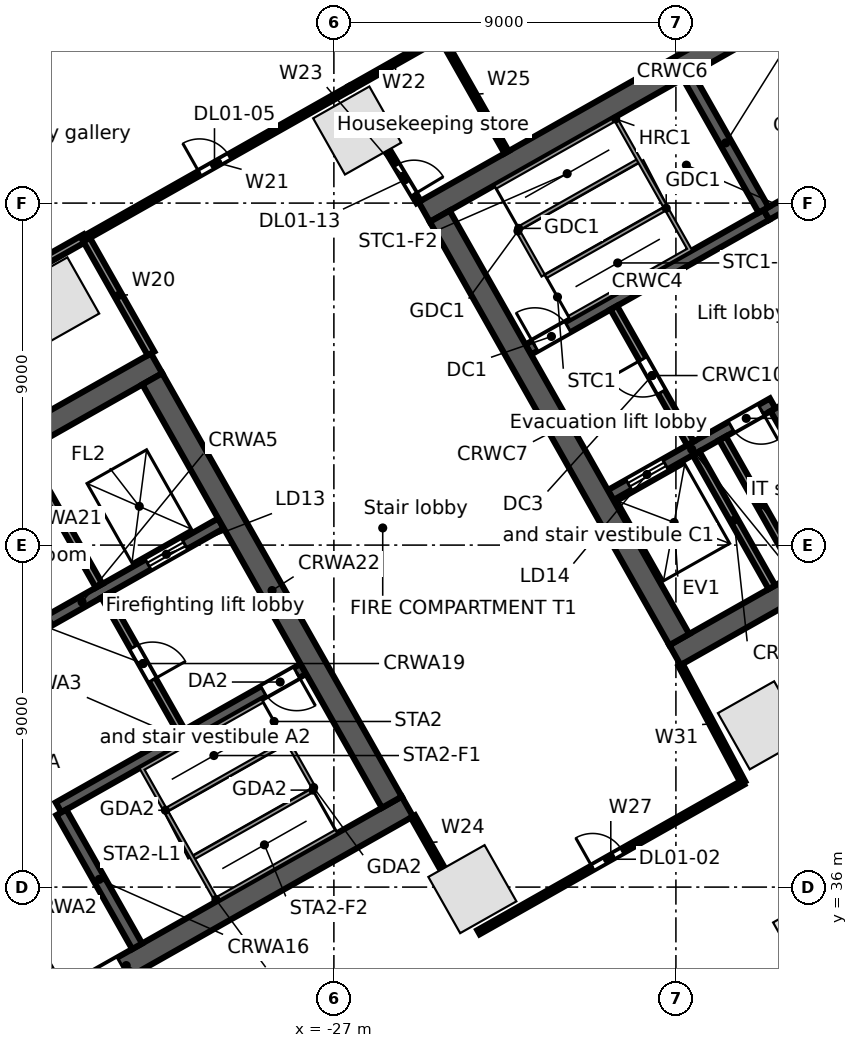
"""IFC4 building model, lengths in metres.
Left out: names, types, materials, properties, quantities, classifications, styles, units other than length and angle.
Written with IfcOpenShell. Run it as: python <this file> out.ifc"""

import sys

from ifc_helpers import new_model, si_unit, direction, frame, frame_2d, origin, origin_2d, place, context, subcontext, project, spatial, rectangle, extrude, element, fill, save


model = new_model("IFC4")
c1 = context("Model", 3, precision=1e-05, world=origin(), true_north=direction((0.0, 1.0)))
c2 = subcontext(c1, "Body", "Model", "MODEL_VIEW")
j1 = project(units=[si_unit("LENGTHUNIT", "METRE"), si_unit("PLANEANGLEUNIT", "RADIAN")], contexts=[c1])
p1 = place(None, origin())
s1 = spatial("IfcSite", under=j1, at=p1, CompositionType="ELEMENT")
p2 = place(p1, origin())
s2 = spatial("IfcBuilding", under=s1, at=p2, CompositionType="ELEMENT")
p3 = place(p2, frame((0.0, 0.0, 11.5)))
s3 = spatial("IfcBuildingStorey", under=s2, at=p3, CompositionType="ELEMENT", Elevation=11.5)
for number, where, z_axis, x_axis in (
    (1, (-26.388, 55.91, 0.0), (0.0, 0.0, 1.0), (-0.87, -0.492, 0.0)),
    (2, (-34.334, 51.414, 0.0), (0.0, 0.0, 1.0), (-0.87, -0.492, 0.0)),
    (3, (-23.356, 35.946, 0.0), (0.0, 0.0, 1.0), (0.87, 0.492, 0.0)),
    (4, (-15.736, 40.257, 0.0), (0.0, 0.0, 1.0), (0.87, 0.492, 0.0)),
):
    element("IfcColumn", number, at=place(p3, frame(where, z_axis=z_axis, x_axis=x_axis)), inside=s3, PredefinedType="COLUMN", context=c2, shape_type="SweptSolid", body=[
        extrude(rectangle(XDim=1.7, YDim=1.7, at=origin_2d()), origin(), (0.0, 0.0, 1.0), 5.0),
    ])
p4 = place(p3, frame((-14.761, 34.88, 0.0), z_axis=(0.0, 0.0, 1.0), x_axis=(0.87035569594, 0.492423560103, 0.0)))
e5 = element("IfcColumn", 5, at=p4, inside=s3, PredefinedType="COLUMN", context=c2, shape_type="SweptSolid", body=[
    extrude(rectangle(XDim=1.0, YDim=1.0, at=origin_2d()), origin(), (0.0, 0.0, 1.0), 5.0),
])
p5 = place(p3, frame((-63.707, 41.701, 0.0), z_axis=(0.0, 0.0, 1.0), x_axis=(0.870355510268, 0.492423888277, 0.0)))
e6 = element("IfcWall", 6, at=p5, inside=s3, PredefinedType="STANDARD", context=c2, shape_type="SweptSolid", body=[
    extrude(rectangle(XDim=67.903, YDim=0.3, at=frame_2d((33.952, 0.0))), origin(), (0.0, 0.0, 1.0), 4.65),
])
p6 = place(p3, frame((-39.862, 29.749, 0.0), z_axis=(0.0, 0.0, 1.0), x_axis=(0.870350116061, 0.492433422375, 0.0)))
e7 = element("IfcWall", 7, at=p6, inside=s3, PredefinedType="SOLIDWALL", context=c2, shape_type="SweptSolid", body=[
    extrude(rectangle(XDim=17.0, YDim=0.6, at=frame_2d((8.5, 0.0))), origin(), (0.0, 0.0, 1.0), 4.65),
])
p7 = place(p6, frame((7.2, 0.0, 0.0)))
e8 = element("IfcOpeningElement", 8, at=p7, cuts=e7, PredefinedType="OPENING", context=c2, shape_type="SweptSolid", body=[
    extrude(rectangle(XDim=1.2, YDim=2.1, at=frame_2d((0.6, 1.05))), frame((0.0, 0.31, 0.0), z_axis=(0.0, -1.0, 0.0), x_axis=(1.0, 0.0, 0.0)), (0.0, 0.0, 1.0), 0.62),
])
p8 = place(p3, frame((-34.245, 38.097, 0.0), z_axis=(0.0, 0.0, 1.0), x_axis=(0.870364910201, 0.492407273597, 0.0)))
e9 = element("IfcWall", 9, at=p8, inside=s3, PredefinedType="SOLIDWALL", context=c2, shape_type="SweptSolid", body=[
    extrude(rectangle(XDim=7.4, YDim=0.3, at=frame_2d((3.7, 0.0))), origin(), (0.0, 0.0, 1.0), 4.65),
])
p9 = place(p8, frame((6.2, 0.0, 0.0)))
e10 = element("IfcOpeningElement", 10, at=p9, cuts=e9, PredefinedType="OPENING", context=c2, shape_type="SweptSolid", body=[
    extrude(rectangle(XDim=1.0, YDim=2.1, at=frame_2d((0.5, 1.05))), frame((0.0, 0.16, 0.0), z_axis=(0.0, -1.0, 0.0), x_axis=(1.0, 0.0, 0.0)), (0.0, 0.0, 1.0), 0.32),
])
p10 = place(p3, frame((-37.282, 41.435, 0.0), z_axis=(0.0, 0.0, 1.0), x_axis=(0.870356516133, 0.492422110414, 0.0)))
e11 = element("IfcWall", 11, at=p10, inside=s3, PredefinedType="SOLIDWALL", context=c2, shape_type="SweptSolid", body=[
    extrude(rectangle(XDim=8.4, YDim=0.3, at=frame_2d((4.2, 0.0))), origin(), (0.0, 0.0, 1.0), 4.65),
])
p11 = place(p10, frame((6.2, 0.0, 0.0)))
e12 = element("IfcOpeningElement", 12, at=p11, cuts=e11, PredefinedType="OPENING", context=c2, shape_type="SweptSolid", body=[
    extrude(rectangle(XDim=1.1, YDim=2.1, at=frame_2d((0.55, 1.05))), frame((0.0, 0.16, 0.0), z_axis=(0.0, -1.0, 0.0), x_axis=(1.0, 0.0, 0.0)), (0.0, 0.0, 1.0), 0.32),
])
p12 = place(p10, frame((2.35, 0.0, 0.0)))
e13 = element("IfcOpeningElement", 13, at=p12, cuts=e11, PredefinedType="OPENING", context=c2, shape_type="SweptSolid", body=[
    extrude(rectangle(XDim=0.9, YDim=2.1, at=frame_2d((0.45, 1.05))), frame((0.0, 0.16, 0.0), z_axis=(0.0, -1.0, 0.0), x_axis=(1.0, 0.0, 0.0)), (0.0, 0.0, 1.0), 0.32),
])
p13 = place(p3, frame((-46.461, 41.412, 0.0), z_axis=(0.0, 0.0, 1.0), x_axis=(0.870350116061, 0.492433422375, 0.0)))
e14 = element("IfcWall", 14, at=p13, inside=s3, PredefinedType="SOLIDWALL", context=c2, shape_type="SweptSolid", body=[
    extrude(rectangle(XDim=17.0, YDim=0.6, at=frame_2d((8.5, 0.0))), origin(), (0.0, 0.0, 1.0), 4.65),
])
p14 = place(p3, frame((-36.26, 36.785, 0.0), z_axis=(0.0, 0.0, 1.0), x_axis=(0.492440575896, -0.870346068648, 0.0)))
e15 = element("IfcWall", 15, at=p14, inside=s3, PredefinedType="SOLIDWALL", context=c2, shape_type="SweptSolid", body=[
    extrude(rectangle(XDim=4.05, YDim=0.3, at=frame_2d((2.025, 0.0))), origin(), (0.0, 0.0, 1.0), 4.65),
])
p15 = place(p3, frame((-34.171, 37.967, 0.0), z_axis=(0.0, 0.0, 1.0), x_axis=(0.492394910396, -0.870371904542, 0.0)))
e16 = element("IfcWall", 16, at=p15, inside=s3, PredefinedType="SOLIDWALL", context=c2, shape_type="SweptSolid", body=[
    extrude(rectangle(XDim=4.05, YDim=0.3, at=frame_2d((2.025, 0.0))), origin(), (0.0, 0.0, 1.0), 4.65),
])
p16 = place(p3, frame((-33.031, 43.667, 0.0), z_axis=(0.0, 0.0, 1.0), x_axis=(0.492408451753, -0.87036424366, 0.0)))
e17 = element("IfcWall", 17, at=p16, inside=s3, PredefinedType="PARTITIONING", context=c2, shape_type="SweptSolid", body=[
    extrude(rectangle(XDim=4.1, YDim=0.2, at=frame_2d((2.05, 0.0))), origin(), (0.0, 0.0, 1.0), 4.65),
])
p17 = place(p16, frame((1.55, 0.0, 0.0)))
e18 = element("IfcOpeningElement", 18, at=p17, cuts=e17, PredefinedType="OPENING", context=c2, shape_type="SweptSolid", body=[
    extrude(rectangle(XDim=1.0, YDim=2.1, at=frame_2d((0.5, 1.05))), frame((0.0, 0.11, 0.0), z_axis=(0.0, -1.0, 0.0), x_axis=(1.0, 0.0, 0.0)), (0.0, 0.0, 1.0), 0.22),
])
p18 = place(p3, frame((-35.173, 47.454, 0.0), z_axis=(0.0, 0.0, 1.0), x_axis=(0.492440575896, -0.870346068648, 0.0)))
e19 = element("IfcWall", 19, at=p18, inside=s3, PredefinedType="SOLIDWALL", context=c2, shape_type="SweptSolid", body=[
    extrude(rectangle(XDim=4.05, YDim=0.2, at=frame_2d((2.025, 0.0))), origin(), (0.0, 0.0, 1.0), 4.65),
])
p19 = place(p3, frame((-31.778, 49.374, 0.0), z_axis=(0.0, 0.0, 1.0), x_axis=(0.492433046652, -0.870350328641, 0.0)))
e20 = element("IfcWall", 20, at=p19, inside=s3, PredefinedType="SOLIDWALL", context=c2, shape_type="SweptSolid", body=[
    extrude(rectangle(XDim=12.8, YDim=0.6, at=frame_2d((6.4, 0.0))), origin(), (0.0, 0.0, 1.0), 4.65),
])
p20 = place(p3, frame((-18.024, 42.104, 0.0), z_axis=(0.0, 0.0, 1.0), x_axis=(0.870360574057, 0.492414937962, 0.0)))
e21 = element("IfcWall", 21, at=p20, inside=s3, PredefinedType="SOLIDWALL", context=c2, shape_type="SweptSolid", body=[
    extrude(rectangle(XDim=15.0, YDim=0.6, at=frame_2d((7.5, 0.0))), origin(), (0.0, 0.0, 1.0), 4.65),
])
p21 = place(p20, frame((6.1, 0.0, 0.0)))
e22 = element("IfcOpeningElement", 22, at=p21, cuts=e21, PredefinedType="OPENING", context=c2, shape_type="SweptSolid", body=[
    extrude(rectangle(XDim=1.2, YDim=2.1, at=frame_2d((0.6, 1.05))), frame((0.0, 0.31, 0.0), z_axis=(0.0, -1.0, 0.0), x_axis=(1.0, 0.0, 0.0)), (0.0, 0.0, 1.0), 0.62),
])
p22 = place(p3, frame((-19.718, 46.316, 0.0), z_axis=(0.0, 0.0, 1.0), x_axis=(0.870353963862, 0.492426621528, 0.0)))
e23 = element("IfcWall", 23, at=p22, inside=s3, PredefinedType="SOLIDWALL", context=c2, shape_type="SweptSolid", body=[
    extrude(rectangle(XDim=4.9, YDim=0.3, at=frame_2d((2.45, 0.0))), origin(), (0.0, 0.0, 1.0), 4.65),
])
p23 = place(p22, frame((0.55, 0.0, 0.0)))
e24 = element("IfcOpeningElement", 24, at=p23, cuts=e23, PredefinedType="OPENING", context=c2, shape_type="SweptSolid", body=[
    extrude(rectangle(XDim=1.1, YDim=2.1, at=frame_2d((0.55, 1.05))), frame((0.0, 0.16, 0.0), z_axis=(0.0, -1.0, 0.0), x_axis=(1.0, 0.0, 0.0)), (0.0, 0.0, 1.0), 0.32),
])
p24 = place(p22, frame((3.65, 0.0, 0.0)))
e25 = element("IfcOpeningElement", 25, at=p24, cuts=e23, PredefinedType="OPENING", context=c2, shape_type="SweptSolid", body=[
    extrude(rectangle(XDim=0.9, YDim=2.1, at=frame_2d((0.45, 1.05))), frame((0.0, 0.16, 0.0), z_axis=(0.0, -1.0, 0.0), x_axis=(1.0, 0.0, 0.0)), (0.0, 0.0, 1.0), 0.32),
])
p25 = place(p3, frame((-21.885, 50.146, 0.0), z_axis=(0.0, 0.0, 1.0), x_axis=(0.870359411463, 0.492416992881, 0.0)))
e26 = element("IfcWall", 26, at=p25, inside=s3, PredefinedType="SOLIDWALL", context=c2, shape_type="SweptSolid", body=[
    extrude(rectangle(XDim=7.2, YDim=0.3, at=frame_2d((3.6, 0.0))), origin(), (0.0, 0.0, 1.0), 4.65),
])
p26 = place(p25, frame((0.2, 0.0, 0.0)))
e27 = element("IfcOpeningElement", 27, at=p26, cuts=e26, PredefinedType="OPENING", context=c2, shape_type="SweptSolid", body=[
    extrude(rectangle(XDim=1.0, YDim=2.1, at=frame_2d((0.5, 1.05))), frame((0.0, 0.16, 0.0), z_axis=(0.0, -1.0, 0.0), x_axis=(1.0, 0.0, 0.0)), (0.0, 0.0, 1.0), 0.32),
])
p27 = place(p3, frame((-15.618, 53.691, 0.0), z_axis=(0.0, 0.0, 1.0), x_axis=(0.870356769198, 0.492421663121, 0.0)))
e28 = element("IfcWall", 28, at=p27, inside=s3, PredefinedType="SOLIDWALL", context=c2, shape_type="SweptSolid", body=[
    extrude(rectangle(XDim=6.6, YDim=0.3, at=frame_2d((3.3, 0.0))), origin(), (0.0, 0.0, 1.0), 4.65),
])
p28 = place(p27, frame((3.0, 0.0, 0.0)))
e29 = element("IfcOpeningElement", 29, at=p28, cuts=e28, PredefinedType="OPENING", context=c2, shape_type="SweptSolid", body=[
    extrude(rectangle(XDim=0.9, YDim=2.1, at=frame_2d((0.45, 1.05))), frame((0.0, 0.16, 0.0), z_axis=(0.0, -1.0, 0.0), x_axis=(1.0, 0.0, 0.0)), (0.0, 0.0, 1.0), 0.32),
])
p29 = place(p3, frame((-24.623, 53.767, 0.0), z_axis=(0.0, 0.0, 1.0), x_axis=(0.870356627484, 0.492421913601, 0.0)))
e30 = element("IfcWall", 30, at=p29, inside=s3, PredefinedType="SOLIDWALL", context=c2, shape_type="SweptSolid", body=[
    extrude(rectangle(XDim=15.0, YDim=0.6, at=frame_2d((7.5, 0.0))), origin(), (0.0, 0.0, 1.0), 4.65),
])
p30 = place(p3, frame((-24.214, 53.654, 0.0), z_axis=(0.0, 0.0, 1.0), x_axis=(0.492441221355, -0.870345703448, 0.0)))
e31 = element("IfcWall", 31, at=p30, inside=s3, PredefinedType="SOLIDWALL", context=c2, shape_type="SweptSolid", body=[
    extrude(rectangle(XDim=12.8, YDim=0.6, at=frame_2d((6.4, 0.0))), origin(), (0.0, 0.0, 1.0), 4.65),
])
p31 = place(p3, frame((-17.469, 47.417, 0.0), z_axis=(0.0, 0.0, 1.0), x_axis=(0.492440575896, -0.870346068648, 0.0)))
e32 = element("IfcWall", 32, at=p31, inside=s3, PredefinedType="SOLIDWALL", context=c2, shape_type="SweptSolid", body=[
    extrude(rectangle(XDim=4.05, YDim=0.2, at=frame_2d((2.025, 0.0))), origin(), (0.0, 0.0, 1.0), 4.65),
])
p32 = place(p3, frame((-19.635, 51.246, 0.0), z_axis=(0.0, 0.0, 1.0), x_axis=(0.492408451753, -0.87036424366, 0.0)))
e33 = element("IfcWall", 33, at=p32, inside=s3, PredefinedType="PARTITIONING", context=c2, shape_type="SweptSolid", body=[
    extrude(rectangle(XDim=4.1, YDim=0.2, at=frame_2d((2.05, 0.0))), origin(), (0.0, 0.0, 1.0), 4.65),
])
p33 = place(p32, frame((1.55, 0.0, 0.0)))
e34 = element("IfcOpeningElement", 34, at=p33, cuts=e33, PredefinedType="OPENING", context=c2, shape_type="SweptSolid", body=[
    extrude(rectangle(XDim=1.0, YDim=2.1, at=frame_2d((0.5, 1.05))), frame((0.0, 0.11, 0.0), z_axis=(0.0, -1.0, 0.0), x_axis=(1.0, 0.0, 0.0)), (0.0, 0.0, 1.0), 0.22),
])
p34 = place(p3, frame((-16.772, 47.811, 0.0), z_axis=(0.0, 0.0, 1.0), x_axis=(0.492440575896, -0.870346068648, 0.0)))
e35 = element("IfcWall", 35, at=p34, inside=s3, PredefinedType="SOLIDWALL", context=c2, shape_type="SweptSolid", body=[
    extrude(rectangle(XDim=4.05, YDim=0.2, at=frame_2d((2.025, 0.0))), origin(), (0.0, 0.0, 1.0), 4.65),
])
p35 = place(p3, frame((-15.379, 48.599, 0.0), z_axis=(0.0, 0.0, 1.0), x_axis=(0.492394910396, -0.870371904542, 0.0)))
e36 = element("IfcWall", 36, at=p35, inside=s3, PredefinedType="SOLIDWALL", context=c2, shape_type="SweptSolid", body=[
    extrude(rectangle(XDim=4.05, YDim=0.3, at=frame_2d((2.025, 0.0))), origin(), (0.0, 0.0, 1.0), 4.65),
])
p36 = place(p3, frame((-17.686, 57.347, 0.0), z_axis=(0.0, 0.0, 1.0), x_axis=(0.492420746998, -0.870357287513, 0.0)))
e37 = element("IfcWall", 37, at=p36, inside=s3, PredefinedType="SOLIDWALL", context=c2, shape_type="SweptSolid", body=[
    extrude(rectangle(XDim=4.05, YDim=0.3, at=frame_2d((2.025, 0.0))), origin(), (0.0, 0.0, 1.0), 4.65),
])
p37 = place(p3, frame((-40.934, 48.905, 0.0), z_axis=(0.0, 0.0, 1.0), x_axis=(0.870387854278, 0.492366716102, 0.0)))
e38 = element("IfcWall", 38, at=p37, inside=s3, PredefinedType="PARTITIONING", context=c2, shape_type="SweptSolid", body=[
    extrude(rectangle(XDim=8.5, YDim=0.2, at=frame_2d((4.25, 0.0))), origin(), (0.0, 0.0, 1.0), 4.03),
])
p38 = place(p3, frame((-33.536, 53.09, 0.0), z_axis=(0.0, 0.0, 1.0), x_axis=(0.492521469645, -0.870300294116, 0.0)))
e39 = element("IfcWall", 39, at=p38, inside=s3, PredefinedType="PARTITIONING", context=c2, shape_type="SweptSolid", body=[
    extrude(rectangle(XDim=3.5, YDim=0.2, at=frame_2d((1.75, 0.0))), origin(), (0.0, 0.0, 1.0), 3.93),
])
p39 = place(p3, frame((-33.536, 53.09, 0.0), z_axis=(0.0, 0.0, 1.0), x_axis=(0.870327439455, 0.492473499928, 0.0)))
e40 = element("IfcWall", 40, at=p39, inside=s3, PredefinedType="PARTITIONING", context=c2, shape_type="SweptSolid", body=[
    extrude(rectangle(XDim=8.0, YDim=0.125, at=frame_2d((4.0, 0.0))), origin(), (0.0, 0.0, 1.0), 3.712),
])
p40 = place(p39, frame((3.45, 0.0, 0.0)))
e41 = element("IfcOpeningElement", 41, at=p40, cuts=e40, PredefinedType="OPENING", context=c2, shape_type="SweptSolid", body=[
    extrude(rectangle(XDim=0.9, YDim=2.1, at=frame_2d((0.45, 1.05))), frame((0.0, 0.073, 0.0), z_axis=(0.0, -1.0, 0.0), x_axis=(1.0, 0.0, 0.0)), (0.0, 0.0, 1.0), 0.145),
])
p41 = place(p3, frame((-26.573, 57.03, 0.0), z_axis=(0.0, 0.0, 1.0), x_axis=(0.870344460795, 0.492443417626, 0.0)))
e42 = element("IfcWall", 42, at=p41, inside=s3, PredefinedType="PARTITIONING", context=c2, shape_type="SweptSolid", body=[
    extrude(rectangle(XDim=2.75, YDim=0.125, at=frame_2d((1.375, 0.0))), origin(), (0.0, 0.0, 1.0), 4.65),
])
p42 = place(p3, frame((-25.587, 55.387, 0.0), z_axis=(0.0, 0.0, 1.0), x_axis=(0.514767546849, -0.857329792268, 0.0)))
e43 = element("IfcWall", 43, at=p42, inside=s3, PredefinedType="PARTITIONING", context=c2, shape_type="SweptSolid", body=[
    extrude(rectangle(XDim=1.585, YDim=0.125, at=frame_2d((0.792, 0.0))), origin(), (0.0, 0.0, 1.0), 4.65),
])
p43 = place(p42, frame((0.45, 0.0, 0.0)))
e44 = element("IfcOpeningElement", 44, at=p43, cuts=e43, PredefinedType="OPENING", context=c2, shape_type="SweptSolid", body=[
    extrude(rectangle(XDim=0.9, YDim=2.1, at=frame_2d((0.45, 1.05))), frame((0.0, 0.073, 0.0), z_axis=(0.0, -1.0, 0.0), x_axis=(1.0, 0.0, 0.0)), (0.0, 0.0, 1.0), 0.145),
])
p44 = place(p3, frame((-24.919, 37.859, 0.0), z_axis=(0.0, 0.0, 1.0), x_axis=(0.492366981934, -0.870387703901, 0.0)))
e45 = element("IfcWall", 45, at=p44, inside=s3, PredefinedType="PARTITIONING", context=c2, shape_type="SweptSolid", body=[
    extrude(rectangle(XDim=1.584, YDim=0.125, at=frame_2d((0.792, 0.0))), origin(), (0.0, 0.0, 1.0), 4.65),
])
p45 = place(p3, frame((-24.18, 58.384, 0.0), z_axis=(0.0, 0.0, 1.0), x_axis=(0.492521469645, -0.870300294116, 0.0)))
e46 = element("IfcWall", 46, at=p45, inside=s3, PredefinedType="PARTITIONING", context=c2, shape_type="SweptSolid", body=[
    extrude(rectangle(XDim=3.5, YDim=0.125, at=frame_2d((1.75, 0.0))), origin(), (0.0, 0.0, 1.0), 3.93),
])
p46 = place(p3, frame((-23.195, 34.813, 0.0), z_axis=(0.0, 0.0, 1.0), x_axis=(0.870387155114, 0.492367952057, 0.0)))
e47 = element("IfcWall", 47, at=p46, inside=s3, PredefinedType="PARTITIONING", context=c2, shape_type="SweptSolid", body=[
    extrude(rectangle(XDim=8.0, YDim=0.125, at=frame_2d((4.0, 0.0))), origin(), (0.0, 0.0, 1.0), 4.03),
])
p47 = place(p46, frame((3.45, 0.0, 0.0)))
e48 = element("IfcOpeningElement", 48, at=p47, cuts=e47, PredefinedType="OPENING", context=c2, shape_type="SweptSolid", body=[
    extrude(rectangle(XDim=0.9, YDim=2.1, at=frame_2d((0.45, 1.05))), frame((0.0, 0.073, 0.0), z_axis=(0.0, -1.0, 0.0), x_axis=(1.0, 0.0, 0.0)), (0.0, 0.0, 1.0), 0.145),
])
p48 = place(p3, frame((-17.877, 41.843, 0.0), z_axis=(0.0, 0.0, 1.0), x_axis=(0.469799130562, -0.882773344026, 0.0)))
e49 = element("IfcWall", 49, at=p48, inside=s3, PredefinedType="PARTITIONING", context=c2, shape_type="SweptSolid", body=[
    extrude(rectangle(XDim=3.501, YDim=0.125, at=frame_2d((1.751, 0.0))), origin(), (0.0, 0.0, 1.0), 3.93),
])
p49 = place(p11, origin())
e50 = element("IfcDoor", 50, at=p49, inside=s3, OperationType="DOUBLE_DOOR_SLIDING", PredefinedType="DOOR", context=c2, shape_type="SweptSolid", body=[
    extrude(rectangle(XDim=1.1, YDim=2.1, at=frame_2d((0.55, 1.05))), frame((0.0, 0.025, 0.0), z_axis=(0.0, -1.0, 0.0), x_axis=(1.0, 0.0, 0.0)), (0.0, 0.0, 1.0), 0.05),
])
fill(e12, e50)
p50 = place(p9, frame((1.0, 0.0, 0.0), z_axis=(0.0, 0.0, 1.0), x_axis=(-1.0, 0.0, 0.0)))
e51 = element("IfcDoor", 51, at=p50, inside=s3, OperationType="SINGLE_SWING_LEFT", PredefinedType="DOOR", context=c2, shape_type="SweptSolid", body=[
    extrude(rectangle(XDim=1.0, YDim=2.1, at=frame_2d((0.5, 1.05))), frame((0.0, 0.025, 0.0), z_axis=(0.0, -1.0, 0.0), x_axis=(1.0, 0.0, 0.0)), (0.0, 0.0, 1.0), 0.05),
])
fill(e10, e51)
p51 = place(p17, origin())
e52 = element("IfcDoor", 52, at=p51, inside=s3, OperationType="SINGLE_SWING_RIGHT", PredefinedType="DOOR", context=c2, shape_type="SweptSolid", body=[
    extrude(rectangle(XDim=1.0, YDim=2.1, at=frame_2d((0.5, 1.05))), frame((0.0, 0.025, 0.0), z_axis=(0.0, -1.0, 0.0), x_axis=(1.0, 0.0, 0.0)), (0.0, 0.0, 1.0), 0.05),
])
fill(e18, e52)
p52 = place(p7, frame((1.2, 0.0, 0.0), z_axis=(0.0, 0.0, 1.0), x_axis=(-1.0, 0.0, 0.0)))
e53 = element("IfcDoor", 53, at=p52, inside=s3, OperationType="SINGLE_SWING_RIGHT", PredefinedType="DOOR", context=c2, shape_type="SweptSolid", body=[
    extrude(rectangle(XDim=1.2, YDim=2.1, at=frame_2d((0.6, 1.05))), frame((0.0, 0.025, 0.0), z_axis=(0.0, -1.0, 0.0), x_axis=(1.0, 0.0, 0.0)), (0.0, 0.0, 1.0), 0.05),
])
fill(e8, e53)
p53 = place(p23, origin())
e54 = element("IfcDoor", 54, at=p53, inside=s3, OperationType="DOUBLE_DOOR_SLIDING", PredefinedType="DOOR", context=c2, shape_type="SweptSolid", body=[
    extrude(rectangle(XDim=1.1, YDim=2.1, at=frame_2d((0.55, 1.05))), frame((0.0, 0.025, 0.0), z_axis=(0.0, -1.0, 0.0), x_axis=(1.0, 0.0, 0.0)), (0.0, 0.0, 1.0), 0.05),
])
fill(e24, e54)
p54 = place(p26, origin())
e55 = element("IfcDoor", 55, at=p54, inside=s3, OperationType="SINGLE_SWING_LEFT", PredefinedType="DOOR", context=c2, shape_type="SweptSolid", body=[
    extrude(rectangle(XDim=1.0, YDim=2.1, at=frame_2d((0.5, 1.05))), frame((0.0, 0.025, 0.0), z_axis=(0.0, -1.0, 0.0), x_axis=(1.0, 0.0, 0.0)), (0.0, 0.0, 1.0), 0.05),
])
fill(e27, e55)
p55 = place(p33, frame((1.0, 0.0, 0.0), z_axis=(0.0, 0.0, 1.0), x_axis=(-1.0, 0.0, 0.0)))
e56 = element("IfcDoor", 56, at=p55, inside=s3, OperationType="SINGLE_SWING_RIGHT", PredefinedType="DOOR", context=c2, shape_type="SweptSolid", body=[
    extrude(rectangle(XDim=1.0, YDim=2.1, at=frame_2d((0.5, 1.05))), frame((0.0, 0.025, 0.0), z_axis=(0.0, -1.0, 0.0), x_axis=(1.0, 0.0, 0.0)), (0.0, 0.0, 1.0), 0.05),
])
fill(e34, e56)
p56 = place(p24, frame((0.9, 0.0, 0.0), z_axis=(0.0, 0.0, 1.0), x_axis=(-1.0, 0.0, 0.0)))
e57 = element("IfcDoor", 57, at=p56, inside=s3, OperationType="SINGLE_SWING_LEFT", PredefinedType="DOOR", context=c2, shape_type="SweptSolid", body=[
    extrude(rectangle(XDim=0.9, YDim=2.1, at=frame_2d((0.45, 1.05))), frame((0.0, 0.025, 0.0), z_axis=(0.0, -1.0, 0.0), x_axis=(1.0, 0.0, 0.0)), (0.0, 0.0, 1.0), 0.05),
])
fill(e25, e57)
p57 = place(p47, origin())
e58 = element("IfcDoor", 58, at=p57, inside=s3, OperationType="SINGLE_SWING_LEFT", PredefinedType="DOOR", context=c2, shape_type="SweptSolid", body=[
    extrude(rectangle(XDim=0.9, YDim=2.1, at=frame_2d((0.45, 1.05))), frame((0.0, 0.025, 0.0), z_axis=(0.0, -1.0, 0.0), x_axis=(1.0, 0.0, 0.0)), (0.0, 0.0, 1.0), 0.05),
])
fill(e48, e58)
p58 = place(p40, origin())
e59 = element("IfcDoor", 59, at=p58, inside=s3, OperationType="SINGLE_SWING_LEFT", PredefinedType="DOOR", context=c2, shape_type="SweptSolid", body=[
    extrude(rectangle(XDim=0.9, YDim=2.1, at=frame_2d((0.45, 1.05))), frame((0.0, 0.025, 0.0), z_axis=(0.0, -1.0, 0.0), x_axis=(1.0, 0.0, 0.0)), (0.0, 0.0, 1.0), 0.05),
])
fill(e41, e59)
p59 = place(p43, origin())
e60 = element("IfcDoor", 60, at=p59, inside=s3, OperationType="SINGLE_SWING_RIGHT", PredefinedType="DOOR", context=c2, shape_type="SweptSolid", body=[
    extrude(rectangle(XDim=0.9, YDim=2.1, at=frame_2d((0.45, 1.05))), frame((0.0, 0.025, 0.0), z_axis=(0.0, -1.0, 0.0), x_axis=(1.0, 0.0, 0.0)), (0.0, 0.0, 1.0), 0.05),
])
fill(e44, e60)
save(model, sys.argv[1])
